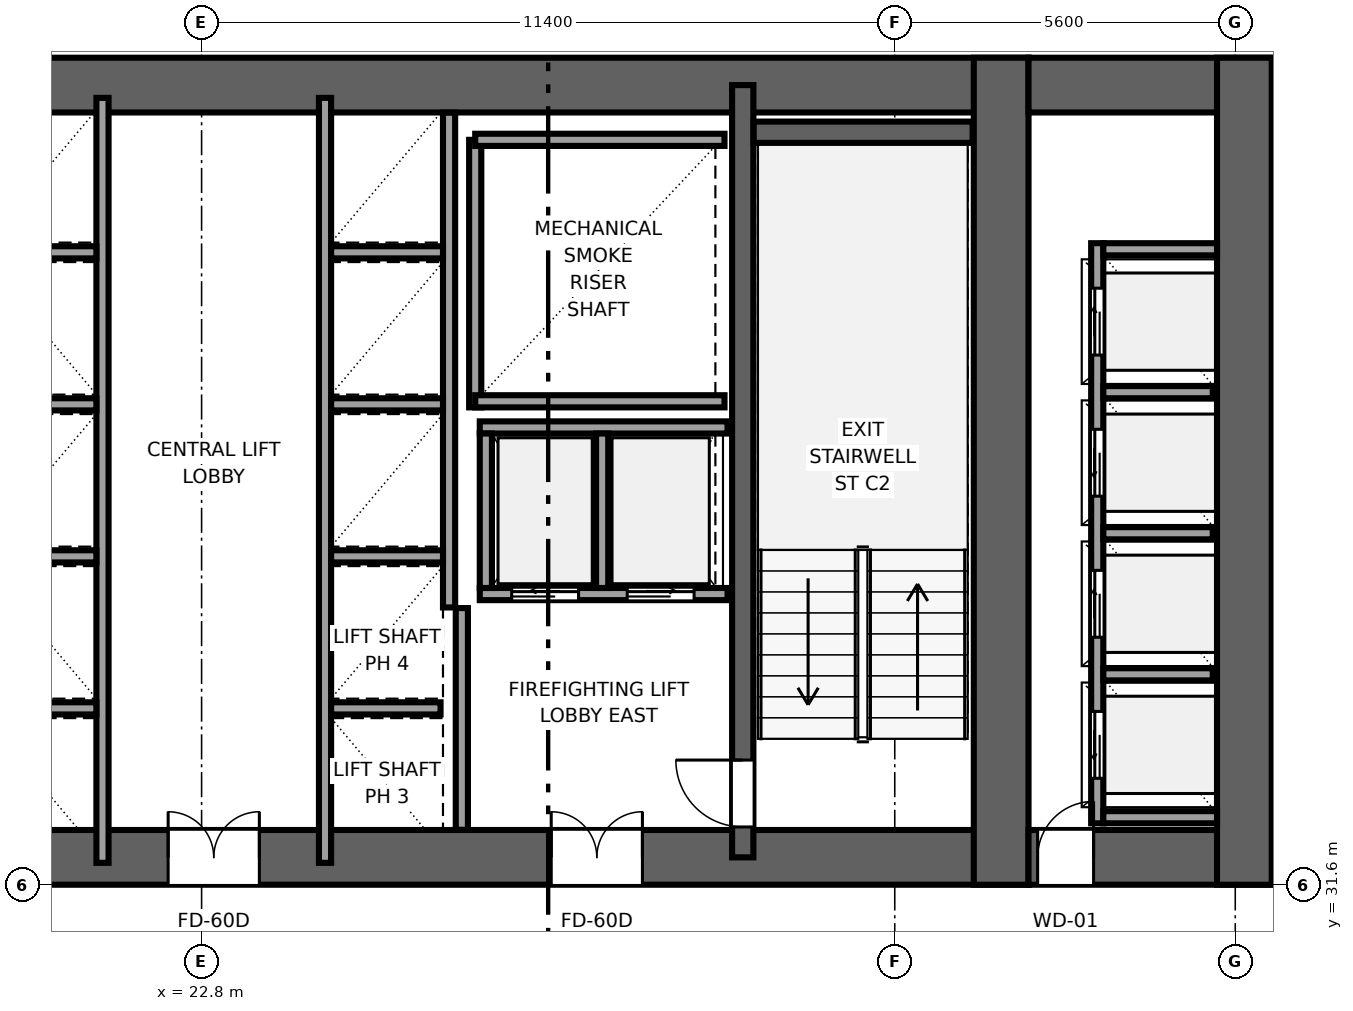
"""IFC4 building model, lengths in metres.
Left out: names, types, materials, properties, quantities, classifications, styles, units other than length and angle.
Written with IfcOpenShell. Run it as: python <this file> out.ifc"""

import sys

from ifc_helpers import new_model, si_unit, direction, frame, frame_2d, origin, place, context, subcontext, project, spatial, rectangle, extrude, source, transform, mapped, element, fill, save


model = new_model("IFC4")
c1 = context("Model", 3, precision=1e-05, world=origin(), true_north=direction((0.0, 1.0)))
c2 = subcontext(c1, "Body", "Model", "MODEL_VIEW")
j1 = project(units=[si_unit("LENGTHUNIT", "METRE"), si_unit("PLANEANGLEUNIT", "RADIAN")], contexts=[c1])
p1 = place(None, origin())
s1 = spatial("IfcSite", under=j1, at=p1, CompositionType="ELEMENT")
p2 = place(p1, origin())
s2 = spatial("IfcBuilding", under=s1, at=p2, CompositionType="ELEMENT")
p3 = place(p2, frame((0.0, 0.0, 78.15)))
s3 = spatial("IfcBuildingStorey", under=s2, at=p3, CompositionType="ELEMENT", Elevation=78.15)
p4 = place(p3, frame((9.6, 32.05, 0.0), z_axis=(0.0, 0.0, 1.0), x_axis=(1.0, 0.0, 0.0)))
e1 = element("IfcWall", 1, at=p4, inside=s3, PredefinedType="SHEAR", context=c2, shape_type="SweptSolid", body=[
    extrude(rectangle(XDim=26.8, YDim=0.9, at=frame_2d((13.4, 0.0))), origin(), (0.0, 0.0, 1.0), 3.55),
])
p5 = place(p4, frame((6.52, 0.0, 0.0), z_axis=(0.0, 0.0, 1.0), x_axis=(-1.0, 0.0, 0.0)))
e2 = element("IfcOpeningElement", 2, at=p5, cuts=e1, PredefinedType="OPENING", context=c2, shape_type="SweptSolid", body=[
    extrude(rectangle(XDim=1.5, YDim=2.04, at=frame_2d((0.75, 1.02))), frame((0.0, 0.46, 0.0), z_axis=(0.0, -1.0, 0.0), x_axis=(1.0, 0.0, 0.0)), (0.0, 0.0, 1.0), 0.92),
])
p6 = place(p4, frame((14.15, 0.0, 0.0), z_axis=(0.0, 0.0, 1.0), x_axis=(-1.0, 0.0, 0.0)))
e3 = element("IfcOpeningElement", 3, at=p6, cuts=e1, PredefinedType="OPENING", context=c2, shape_type="SweptSolid", body=[
    extrude(rectangle(XDim=1.5, YDim=2.04, at=frame_2d((0.75, 1.02))), frame((0.0, 0.46, 0.0), z_axis=(0.0, -1.0, 0.0), x_axis=(1.0, 0.0, 0.0)), (0.0, 0.0, 1.0), 0.92),
])
p7 = place(p4, frame((20.45, 0.0, 0.0), z_axis=(0.0, 0.0, 1.0), x_axis=(-1.0, 0.0, 0.0)))
e4 = element("IfcOpeningElement", 4, at=p7, cuts=e1, PredefinedType="OPENING", context=c2, shape_type="SweptSolid", body=[
    extrude(rectangle(XDim=1.5, YDim=2.04, at=frame_2d((0.75, 1.02))), frame((0.0, 0.46, 0.0), z_axis=(0.0, -1.0, 0.0), x_axis=(1.0, 0.0, 0.0)), (0.0, 0.0, 1.0), 0.92),
])
p8 = place(p4, frame((8.57, 0.0, 0.0), z_axis=(0.0, 0.0, 1.0), x_axis=(-1.0, 0.0, 0.0)))
e5 = element("IfcOpeningElement", 5, at=p8, cuts=e1, PredefinedType="OPENING", context=c2, shape_type="SweptSolid", body=[
    extrude(rectangle(XDim=0.82, YDim=2.01, at=frame_2d((0.41, 1.005))), frame((0.0, 0.46, 0.0), z_axis=(0.0, -1.0, 0.0), x_axis=(1.0, 0.0, 0.0)), (0.0, 0.0, 1.0), 0.92),
])
p9 = place(p3, frame((9.6, 44.75, 0.0), z_axis=(0.0, 0.0, 1.0), x_axis=(1.0, 0.0, 0.0)))
e6 = element("IfcWall", 6, at=p9, inside=s3, PredefinedType="SHEAR", context=c2, shape_type="SweptSolid", body=[
    extrude(rectangle(XDim=26.8, YDim=0.9, at=frame_2d((13.4, 0.0))), origin(), (0.0, 0.0, 1.0), 3.55),
])
p10 = place(p3, frame((35.95, 31.6, 0.0), z_axis=(0.0, 0.0, 1.0), x_axis=(0.0, 1.0, 0.0)))
e7 = element("IfcWall", 7, at=p10, inside=s3, PredefinedType="SHEAR", context=c2, shape_type="SweptSolid", body=[
    extrude(rectangle(XDim=13.6, YDim=0.9, at=frame_2d((6.8, 0.0))), origin(), (0.0, 0.0, 1.0), 3.55),
])
p11 = place(p3, frame((31.7, 32.05, 0.0), z_axis=(0.0, 0.0, 1.0), x_axis=(0.0, 1.0, 0.0)))
e8 = element("IfcWall", 8, at=p11, inside=s3, PredefinedType="SHEAR", context=c2, shape_type="SweptSolid", body=[
    extrude(rectangle(XDim=12.7, YDim=0.35, at=frame_2d((6.35, 0.0))), origin(), (0.0, 0.0, 1.0), 3.55),
])
p12 = place(p11, frame((1.6, 0.0, 0.0), z_axis=(0.0, 0.0, 1.0), x_axis=(-1.0, 0.0, 0.0)))
e9 = element("IfcOpeningElement", 9, at=p12, cuts=e8, PredefinedType="OPENING", context=c2, shape_type="SweptSolid", body=[
    extrude(rectangle(XDim=1.1, YDim=2.12, at=frame_2d((0.55, 1.06))), frame((0.0, 0.185, 0.0), z_axis=(0.0, -1.0, 0.0), x_axis=(1.0, 0.0, 0.0)), (0.0, 0.0, 1.0), 0.37),
])
p13 = place(p3, frame((36.4, 32.05, 0.0), z_axis=(0.0, 0.0, 1.0), x_axis=(1.0, 0.0, 0.0)))
e10 = element("IfcWall", 10, at=p13, inside=s3, PredefinedType="SHEAR", context=c2, shape_type="SweptSolid", body=[
    extrude(rectangle(XDim=4.0, YDim=0.9, at=frame_2d((2.0, 0.0))), origin(), (0.0, 0.0, 1.0), 3.55),
])
p14 = place(p13, frame((1.07, 0.0, 0.0), z_axis=(0.0, 0.0, 1.0), x_axis=(-1.0, 0.0, 0.0)))
e11 = element("IfcOpeningElement", 11, at=p14, cuts=e10, PredefinedType="OPENING", context=c2, shape_type="SweptSolid", body=[
    extrude(rectangle(XDim=0.92, YDim=2.01, at=frame_2d((0.46, 1.005))), frame((0.0, 0.46, 0.0), z_axis=(0.0, -1.0, 0.0), x_axis=(1.0, 0.0, 0.0)), (0.0, 0.0, 1.0), 0.92),
])
p15 = place(p3, frame((36.4, 44.75, 0.0), z_axis=(0.0, 0.0, 1.0), x_axis=(1.0, 0.0, 0.0)))
e12 = element("IfcWall", 12, at=p15, inside=s3, PredefinedType="SHEAR", context=c2, shape_type="SweptSolid", body=[
    extrude(rectangle(XDim=4.0, YDim=0.9, at=frame_2d((2.0, 0.0))), origin(), (0.0, 0.0, 1.0), 3.55),
])
p16 = place(p3, frame((39.95, 31.6, 0.0), z_axis=(0.0, 0.0, 1.0), x_axis=(0.0, 1.0, 0.0)))
e13 = element("IfcWall", 13, at=p16, inside=s3, PredefinedType="SHEAR", context=c2, shape_type="SweptSolid", body=[
    extrude(rectangle(XDim=13.6, YDim=0.9, at=frame_2d((6.8, 0.0))), origin(), (0.0, 0.0, 1.0), 3.55),
])
p17 = place(p3, frame((31.88, 43.975, 0.0), z_axis=(0.0, 0.0, 1.0), x_axis=(1.0, 0.0, 0.0)))
e14 = element("IfcWall", 14, at=p17, inside=s3, PredefinedType="SHEAR", context=c2, shape_type="SweptSolid", body=[
    extrude(rectangle(XDim=3.6, YDim=0.35, at=frame_2d((1.8, 0.0))), origin(), (0.0, 0.0, 1.0), 3.55),
])
p18 = place(p3, frame((27.3, 39.45, 0.0), z_axis=(0.0, 0.0, 1.0), x_axis=(0.0, 1.0, 0.0)))
e15 = element("IfcWall", 15, at=p18, inside=s3, PredefinedType="SOLIDWALL", context=c2, shape_type="SweptSolid", body=[
    extrude(rectangle(XDim=4.4, YDim=0.2, at=frame_2d((2.2, 0.0))), origin(), (0.0, 0.0, 1.0), 3.37),
])
for number, where, z_axis, x_axis in (
    (16, (27.3, 39.55, 0.0), (0.0, 0.0, 1.0), (1.0, 0.0, 0.0)),
    (17, (27.3, 43.85, 0.0), (0.0, 0.0, 1.0), (1.0, 0.0, 0.0)),
):
    element("IfcWall", number, at=place(p3, frame(where, z_axis=z_axis, x_axis=x_axis)), inside=s3, PredefinedType="SOLIDWALL", context=c2, shape_type="SweptSolid", body=[
        extrude(rectangle(XDim=4.1, YDim=0.2, at=frame_2d((2.05, 0.0))), origin(), (0.0, 0.0, 1.0), 3.37),
    ])
p19 = place(p3, frame((27.08, 32.504, 0.0), z_axis=(0.0, 0.0, 1.0), x_axis=(0.0, 1.0, 0.0)))
e18 = element("IfcWall", 18, at=p19, inside=s3, PredefinedType="SOLIDWALL", context=c2, shape_type="SweptSolid", body=[
    extrude(rectangle(XDim=3.646, YDim=0.2, at=frame_2d((1.823, 0.0))), origin(), (0.0, 0.0, 1.0), 3.37),
])
p20 = place(p3, frame((21.17, 31.96, 0.0), z_axis=(0.0, 0.0, 1.0), x_axis=(0.0, 1.0, 0.0)))
e19 = element("IfcWall", 19, at=p20, inside=s3, PredefinedType="SOLIDWALL", context=c2, shape_type="SweptSolid", body=[
    extrude(rectangle(XDim=12.58, YDim=0.2, at=frame_2d((6.29, 0.0))), origin(), (0.0, 0.0, 1.0), 3.37),
])
p21 = place(p3, frame((19.27, 34.5, 0.0), z_axis=(0.0, 0.0, 1.0), x_axis=(1.0, 0.0, 0.0)))
e20 = element("IfcWall", 20, at=p21, inside=s3, PredefinedType="SOLIDWALL", context=c2, shape_type="SweptSolid", body=[
    extrude(rectangle(XDim=1.8, YDim=0.2, at=frame_2d((0.9, 0.0))), origin(), (0.0, 0.0, 1.0), 3.37),
])
for number, where, z_axis, x_axis in (
    (21, (19.23, 37.0, 0.0), (0.0, 0.0, 1.0), (1.0, 0.0, 0.0)),
    (22, (19.23, 39.5, 0.0), (0.0, 0.0, 1.0), (1.0, 0.0, 0.0)),
    (23, (19.23, 42.0, 0.0), (0.0, 0.0, 1.0), (1.0, 0.0, 0.0)),
):
    element("IfcWall", number, at=place(p3, frame(where, z_axis=z_axis, x_axis=x_axis)), inside=s3, PredefinedType="SOLIDWALL", context=c2, shape_type="SweptSolid", body=[
        extrude(rectangle(XDim=1.84, YDim=0.2, at=frame_2d((0.92, 0.0))), origin(), (0.0, 0.0, 1.0), 3.37),
    ])
p22 = place(p3, frame((27.375, 36.38, 0.0), z_axis=(0.0, 0.0, 1.0), x_axis=(1.0, 0.0, 0.0)))
e24 = element("IfcWall", 24, at=p22, inside=s3, PredefinedType="SOLIDWALL", context=c2, shape_type="SweptSolid", body=[
    extrude(rectangle(XDim=4.075, YDim=0.2, at=frame_2d((2.038, 0.0))), origin(), (0.0, 0.0, 1.0), 3.37),
])
p23 = place(p22, frame((0.525, 0.0, 0.0)))
e25 = element("IfcOpeningElement", 25, at=p23, cuts=e24, PredefinedType="OPENING", context=c2, shape_type="SweptSolid", body=[
    extrude(rectangle(XDim=1.1, YDim=2.12, at=frame_2d((0.55, 1.06))), frame((0.0, 0.11, 0.0), z_axis=(0.0, -1.0, 0.0), x_axis=(1.0, 0.0, 0.0)), (0.0, 0.0, 1.0), 0.22),
])
p24 = place(p22, frame((2.425, 0.0, 0.0)))
e26 = element("IfcOpeningElement", 26, at=p24, cuts=e24, PredefinedType="OPENING", context=c2, shape_type="SweptSolid", body=[
    extrude(rectangle(XDim=1.1, YDim=2.12, at=frame_2d((0.55, 1.06))), frame((0.0, 0.11, 0.0), z_axis=(0.0, -1.0, 0.0), x_axis=(1.0, 0.0, 0.0)), (0.0, 0.0, 1.0), 0.22),
])
p25 = place(p3, frame((27.375, 39.12, 0.0), z_axis=(0.0, 0.0, 1.0), x_axis=(1.0, 0.0, 0.0)))
e27 = element("IfcWall", 27, at=p25, inside=s3, PredefinedType="SOLIDWALL", context=c2, shape_type="SweptSolid", body=[
    extrude(rectangle(XDim=4.075, YDim=0.2, at=frame_2d((2.038, 0.0))), origin(), (0.0, 0.0, 1.0), 3.37),
])
for number, where, z_axis, x_axis in (
    (28, (27.475, 36.48, 0.0), (0.0, 0.0, 1.0), (0.0, 1.0, 0.0)),
    (29, (29.387, 36.48, 0.0), (0.0, 0.0, 1.0), (0.0, 1.0, 0.0)),
):
    element("IfcWall", number, at=place(p3, frame(where, z_axis=z_axis, x_axis=x_axis)), inside=s3, PredefinedType="SOLIDWALL", context=c2, shape_type="SweptSolid", body=[
        extrude(rectangle(XDim=2.54, YDim=0.2, at=frame_2d((1.27, 0.0))), origin(), (0.0, 0.0, 1.0), 3.37),
    ])
p26 = place(p3, frame((24.83, 31.96, 0.0), z_axis=(0.0, 0.0, 1.0), x_axis=(0.0, 1.0, 0.0)))
e30 = element("IfcWall", 30, at=p26, inside=s3, PredefinedType="SOLIDWALL", context=c2, shape_type="SweptSolid", body=[
    extrude(rectangle(XDim=12.58, YDim=0.2, at=frame_2d((6.29, 0.0))), origin(), (0.0, 0.0, 1.0), 3.37),
])
p27 = place(p3, frame((26.87, 36.16, 0.0), z_axis=(0.0, 0.0, 1.0), x_axis=(0.0, 1.0, 0.0)))
e31 = element("IfcWall", 31, at=p27, inside=s3, PredefinedType="SOLIDWALL", context=c2, shape_type="SweptSolid", body=[
    extrude(rectangle(XDim=8.136, YDim=0.2, at=frame_2d((4.068, 0.0))), origin(), (0.0, 0.0, 1.0), 3.37),
])
p28 = place(p3, frame((24.93, 34.5, 0.0), z_axis=(0.0, 0.0, 1.0), x_axis=(1.0, 0.0, 0.0)))
e32 = element("IfcWall", 32, at=p28, inside=s3, PredefinedType="SOLIDWALL", context=c2, shape_type="SweptSolid", body=[
    extrude(rectangle(XDim=1.8, YDim=0.2, at=frame_2d((0.9, 0.0))), origin(), (0.0, 0.0, 1.0), 3.37),
])
for number, where, z_axis, x_axis in (
    (33, (24.93, 37.0, 0.0), (0.0, 0.0, 1.0), (1.0, 0.0, 0.0)),
    (34, (24.93, 39.5, 0.0), (0.0, 0.0, 1.0), (1.0, 0.0, 0.0)),
    (35, (24.93, 42.0, 0.0), (0.0, 0.0, 1.0), (1.0, 0.0, 0.0)),
):
    element("IfcWall", number, at=place(p3, frame(where, z_axis=z_axis, x_axis=x_axis)), inside=s3, PredefinedType="SOLIDWALL", context=c2, shape_type="SweptSolid", body=[
        extrude(rectangle(XDim=1.84, YDim=0.2, at=frame_2d((0.92, 0.0))), origin(), (0.0, 0.0, 1.0), 3.37),
    ])
p29 = place(p3, frame((37.53, 32.61, 0.0), z_axis=(0.0, 0.0, 1.0), x_axis=(0.0, 1.0, 0.0)))
e36 = element("IfcWall", 36, at=p29, inside=s3, PredefinedType="SOLIDWALL", context=c2, shape_type="SweptSolid", body=[
    extrude(rectangle(XDim=9.54, YDim=0.2, at=frame_2d((4.77, 0.0))), origin(), (0.0, 0.0, 1.0), 3.37),
])
p30 = place(p29, frame((0.74, 0.0, 0.0)))
e37 = element("IfcOpeningElement", 37, at=p30, cuts=e36, PredefinedType="OPENING", context=c2, shape_type="SweptSolid", body=[
    extrude(rectangle(XDim=1.1, YDim=2.12, at=frame_2d((0.55, 1.06))), frame((0.0, 0.11, 0.0), z_axis=(0.0, -1.0, 0.0), x_axis=(1.0, 0.0, 0.0)), (0.0, 0.0, 1.0), 0.22),
])
p31 = place(p29, frame((3.06, 0.0, 0.0)))
e38 = element("IfcOpeningElement", 38, at=p31, cuts=e36, PredefinedType="OPENING", context=c2, shape_type="SweptSolid", body=[
    extrude(rectangle(XDim=1.1, YDim=2.12, at=frame_2d((0.55, 1.06))), frame((0.0, 0.11, 0.0), z_axis=(0.0, -1.0, 0.0), x_axis=(1.0, 0.0, 0.0)), (0.0, 0.0, 1.0), 0.22),
])
p32 = place(p29, frame((5.38, 0.0, 0.0)))
e39 = element("IfcOpeningElement", 39, at=p32, cuts=e36, PredefinedType="OPENING", context=c2, shape_type="SweptSolid", body=[
    extrude(rectangle(XDim=1.1, YDim=2.12, at=frame_2d((0.55, 1.06))), frame((0.0, 0.11, 0.0), z_axis=(0.0, -1.0, 0.0), x_axis=(1.0, 0.0, 0.0)), (0.0, 0.0, 1.0), 0.22),
])
p33 = place(p29, frame((7.7, 0.0, 0.0)))
e40 = element("IfcOpeningElement", 40, at=p33, cuts=e36, PredefinedType="OPENING", context=c2, shape_type="SweptSolid", body=[
    extrude(rectangle(XDim=1.1, YDim=2.12, at=frame_2d((0.55, 1.06))), frame((0.0, 0.11, 0.0), z_axis=(0.0, -1.0, 0.0), x_axis=(1.0, 0.0, 0.0)), (0.0, 0.0, 1.0), 0.22),
])
for number, where, z_axis, x_axis in (
    (41, (37.63, 32.71, 0.0), (0.0, 0.0, 1.0), (1.0, 0.0, 0.0)),
    (42, (37.63, 42.05, 0.0), (0.0, 0.0, 1.0), (1.0, 0.0, 0.0)),
):
    element("IfcWall", number, at=place(p3, frame(where, z_axis=z_axis, x_axis=x_axis)), inside=s3, PredefinedType="SOLIDWALL", context=c2, shape_type="SweptSolid", body=[
        extrude(rectangle(XDim=1.87, YDim=0.2, at=frame_2d((0.935, 0.0))), origin(), (0.0, 0.0, 1.0), 3.37),
    ])
for number, where, z_axis, x_axis in (
    (43, (37.63, 35.06, 0.0), (0.0, 0.0, 1.0), (1.0, 0.0, 0.0)),
    (44, (37.63, 37.38, 0.0), (0.0, 0.0, 1.0), (1.0, 0.0, 0.0)),
    (45, (37.63, 39.7, 0.0), (0.0, 0.0, 1.0), (1.0, 0.0, 0.0)),
):
    element("IfcWall", number, at=place(p3, frame(where, z_axis=z_axis, x_axis=x_axis)), inside=s3, PredefinedType="SOLIDWALL", context=c2, shape_type="SweptSolid", body=[
        extrude(rectangle(XDim=1.8, YDim=0.2, at=frame_2d((0.9, 0.0))), origin(), (0.0, 0.0, 1.0), 3.37),
    ])
m1 = source(origin(), c2, "Body", "SweptSolid", [
    extrude(rectangle(XDim=1.1, YDim=2.12, at=frame_2d((0.55, 1.06))), frame((0.0, 0.025, 0.0), z_axis=(0.0, -1.0, 0.0), x_axis=(1.0, 0.0, 0.0)), (0.0, 0.0, 1.0), 0.05),
])
p34 = place(p12, origin())
e46 = element("IfcDoor", 46, at=p34, inside=s3, OperationType="SINGLE_SWING_RIGHT", PredefinedType="DOOR", context=c2, shape_type="MappedRepresentation", body=[
    mapped(m1, transform((0.0, 0.0, 0.0), x_axis=(1.0, 0.0, 0.0), y_axis=(0.0, 1.0, 0.0), z_axis=(0.0, 0.0, 1.0), scale=1.0)),
])
fill(e9, e46)
m2 = source(origin(), c2, "Body", "SweptSolid", [
    extrude(rectangle(XDim=1.5, YDim=2.04, at=frame_2d((0.75, 1.02))), frame((0.0, 0.025, 0.0), z_axis=(0.0, -1.0, 0.0), x_axis=(1.0, 0.0, 0.0)), (0.0, 0.0, 1.0), 0.05),
])
p35 = place(p6, origin())
e47 = element("IfcDoor", 47, at=p35, inside=s3, OperationType="DOUBLE_DOOR_SINGLE_SWING", PredefinedType="DOOR", context=c2, shape_type="MappedRepresentation", body=[
    mapped(m2, transform((0.0, 0.0, 0.0), x_axis=(1.0, 0.0, 0.0), y_axis=(0.0, 1.0, 0.0), z_axis=(0.0, 0.0, 1.0), scale=1.0)),
])
fill(e3, e47)
p36 = place(p7, origin())
e48 = element("IfcDoor", 48, at=p36, inside=s3, OperationType="DOUBLE_DOOR_SINGLE_SWING", PredefinedType="DOOR", context=c2, shape_type="MappedRepresentation", body=[
    mapped(m2, transform((0.0, 0.0, 0.0), x_axis=(1.0, 0.0, 0.0), y_axis=(0.0, 1.0, 0.0), z_axis=(0.0, 0.0, 1.0), scale=1.0)),
])
fill(e4, e48)
m3 = source(origin(), c2, "Body", "SweptSolid", [
    extrude(rectangle(XDim=0.92, YDim=2.01, at=frame_2d((0.46, 1.005))), frame((0.0, 0.025, 0.0), z_axis=(0.0, -1.0, 0.0), x_axis=(1.0, 0.0, 0.0)), (0.0, 0.0, 1.0), 0.05),
])
p37 = place(p14, origin())
e49 = element("IfcDoor", 49, at=p37, inside=s3, OperationType="SINGLE_SWING_RIGHT", PredefinedType="DOOR", context=c2, shape_type="MappedRepresentation", body=[
    mapped(m3, transform((0.0, 0.0, 0.0), x_axis=(1.0, 0.0, 0.0), y_axis=(0.0, 1.0, 0.0), z_axis=(0.0, 0.0, 1.0), scale=1.0)),
])
fill(e11, e49)
m4 = source(origin(), c2, "Body", "SweptSolid", [
    extrude(rectangle(XDim=1.1, YDim=2.12, at=frame_2d((0.55, 1.06))), frame((0.0, 0.025, 0.0), z_axis=(0.0, -1.0, 0.0), x_axis=(1.0, 0.0, 0.0)), (0.0, 0.0, 1.0), 0.05),
])
p38 = place(p23, origin())
e50 = element("IfcDoor", 50, at=p38, inside=s3, OperationType="SLIDING_TO_LEFT", PredefinedType="DOOR", context=c2, shape_type="MappedRepresentation", body=[
    mapped(m4, transform((0.0, 0.0, 0.0), x_axis=(1.0, 0.0, 0.0), y_axis=(0.0, 1.0, 0.0), z_axis=(0.0, 0.0, 1.0), scale=1.0)),
])
fill(e25, e50)
p39 = place(p24, origin())
e51 = element("IfcDoor", 51, at=p39, inside=s3, OperationType="SLIDING_TO_RIGHT", PredefinedType="DOOR", context=c2, shape_type="MappedRepresentation", body=[
    mapped(m4, transform((0.0, 0.0, 0.0), x_axis=(1.0, 0.0, 0.0), y_axis=(0.0, 1.0, 0.0), z_axis=(0.0, 0.0, 1.0), scale=1.0)),
])
fill(e26, e51)
p40 = place(p30, origin())
e52 = element("IfcDoor", 52, at=p40, inside=s3, OperationType="SLIDING_TO_LEFT", PredefinedType="DOOR", context=c2, shape_type="MappedRepresentation", body=[
    mapped(m4, transform((0.0, 0.0, 0.0), x_axis=(1.0, 0.0, 0.0), y_axis=(0.0, 1.0, 0.0), z_axis=(0.0, 0.0, 1.0), scale=1.0)),
])
fill(e37, e52)
p41 = place(p31, origin())
e53 = element("IfcDoor", 53, at=p41, inside=s3, OperationType="SLIDING_TO_RIGHT", PredefinedType="DOOR", context=c2, shape_type="MappedRepresentation", body=[
    mapped(m4, transform((0.0, 0.0, 0.0), x_axis=(1.0, 0.0, 0.0), y_axis=(0.0, 1.0, 0.0), z_axis=(0.0, 0.0, 1.0), scale=1.0)),
])
fill(e38, e53)
p42 = place(p32, origin())
e54 = element("IfcDoor", 54, at=p42, inside=s3, OperationType="SLIDING_TO_LEFT", PredefinedType="DOOR", context=c2, shape_type="MappedRepresentation", body=[
    mapped(m4, transform((0.0, 0.0, 0.0), x_axis=(1.0, 0.0, 0.0), y_axis=(0.0, 1.0, 0.0), z_axis=(0.0, 0.0, 1.0), scale=1.0)),
])
fill(e39, e54)
p43 = place(p33, origin())
e55 = element("IfcDoor", 55, at=p43, inside=s3, OperationType="SLIDING_TO_RIGHT", PredefinedType="DOOR", context=c2, shape_type="MappedRepresentation", body=[
    mapped(m4, transform((0.0, 0.0, 0.0), x_axis=(1.0, 0.0, 0.0), y_axis=(0.0, 1.0, 0.0), z_axis=(0.0, 0.0, 1.0), scale=1.0)),
])
fill(e40, e55)
save(model, sys.argv[1])
